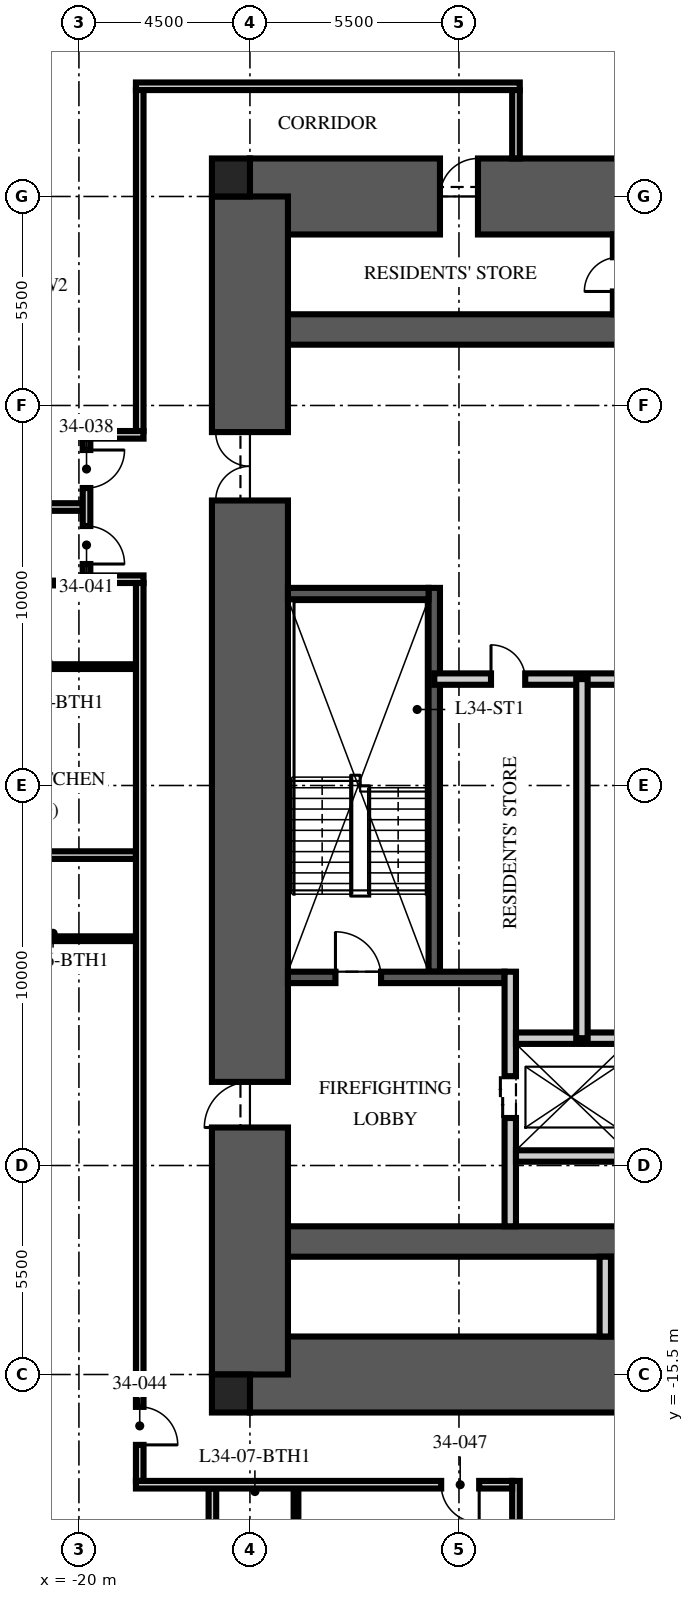
"""IFC4 building model, lengths in metres.
Left out: names, types, materials, properties, quantities, classifications, styles, units other than length and angle.
Written with IfcOpenShell. Run it as: python <this file> out.ifc"""

import sys

from ifc_helpers import new_model, si_unit, direction, frame, frame_2d, origin, origin_2d, place, context, subcontext, project, spatial, rectangle, extrude, element, fill, save


model = new_model("IFC4")
c1 = context("Model", 3, precision=1e-05, world=origin(), true_north=direction((0.0, 1.0)))
c2 = subcontext(c1, "Body", "Model", "MODEL_VIEW")
j1 = project(units=[si_unit("LENGTHUNIT", "METRE"), si_unit("PLANEANGLEUNIT", "RADIAN")], contexts=[c1])
p1 = place(None, origin())
s1 = spatial("IfcSite", under=j1, at=p1, CompositionType="ELEMENT")
p2 = place(p1, origin())
s2 = spatial("IfcBuilding", under=s1, at=p2, CompositionType="ELEMENT")
p3 = place(p2, frame((0.0, 0.0, 137.25)))
s3 = spatial("IfcBuildingStorey", under=s2, at=p3, CompositionType="ELEMENT", Elevation=137.25)
p4 = place(p3, frame((-15.5, 15.5, -0.25), z_axis=(0.0, 0.0, 1.0), x_axis=(1.0, 0.0, 0.0)))
e1 = element("IfcWall", 1, at=p4, inside=s3, PredefinedType="SHEAR", context=c2, shape_type="SweptSolid", body=[
    extrude(rectangle(XDim=31.0, YDim=2.0, at=frame_2d((15.5, 0.0))), origin(), (0.0, 0.0, 1.0), 3.75),
])
p5 = place(p4, frame((5.0, 0.0, 0.25)))
e2 = element("IfcOpeningElement", 2, at=p5, cuts=e1, PredefinedType="OPENING", context=c2, shape_type="SweptSolid", body=[
    extrude(rectangle(XDim=1.0, YDim=2.1, at=frame_2d((0.5, 1.05))), frame((0.0, 1.01, 0.0), z_axis=(0.0, -1.0, 0.0), x_axis=(1.0, 0.0, 0.0)), (0.0, 0.0, 1.0), 2.02),
])
p6 = place(p3, frame((-15.5, -15.5, -0.25), z_axis=(0.0, 0.0, 1.0), x_axis=(1.0, 0.0, 0.0)))
e3 = element("IfcWall", 3, at=p6, inside=s3, PredefinedType="SHEAR", context=c2, shape_type="SweptSolid", body=[
    extrude(rectangle(XDim=31.0, YDim=2.0, at=frame_2d((15.5, 0.0))), origin(), (0.0, 0.0, 1.0), 3.75),
])
p7 = place(p6, frame((10.4, 0.0, 0.25)))
e4 = element("IfcOpeningElement", 4, at=p7, cuts=e3, PredefinedType="OPENING", context=c2, shape_type="SweptSolid", body=[
    extrude(rectangle(XDim=1.1, YDim=2.1, at=frame_2d((0.55, 1.05))), frame((0.0, 1.01, 0.0), z_axis=(0.0, -1.0, 0.0), x_axis=(1.0, 0.0, 0.0)), (0.0, 0.0, 1.0), 2.02),
])
p8 = place(p6, frame((13.5, 0.0, 0.25)))
e5 = element("IfcOpeningElement", 5, at=p8, cuts=e3, PredefinedType="OPENING", context=c2, shape_type="SweptSolid", body=[
    extrude(rectangle(XDim=1.1, YDim=2.1, at=frame_2d((0.55, 1.05))), frame((0.0, 1.01, 0.0), z_axis=(0.0, -1.0, 0.0), x_axis=(1.0, 0.0, 0.0)), (0.0, 0.0, 1.0), 2.02),
])
p9 = place(p6, frame((16.6, 0.0, 0.25)))
e6 = element("IfcOpeningElement", 6, at=p9, cuts=e3, PredefinedType="OPENING", context=c2, shape_type="SweptSolid", body=[
    extrude(rectangle(XDim=1.1, YDim=2.1, at=frame_2d((0.55, 1.05))), frame((0.0, 1.01, 0.0), z_axis=(0.0, -1.0, 0.0), x_axis=(1.0, 0.0, 0.0)), (0.0, 0.0, 1.0), 2.02),
])
for number, where, z_axis, x_axis in (
    (7, (-15.5, 12.0, -0.25), (0.0, 0.0, 1.0), (1.0, 0.0, 0.0)),
    (8, (-15.5, -12.0, -0.25), (0.0, 0.0, 1.0), (1.0, 0.0, 0.0)),
):
    element("IfcWall", number, at=place(p3, frame(where, z_axis=z_axis, x_axis=x_axis)), inside=s3, PredefinedType="SHEAR", context=c2, shape_type="SweptSolid", body=[
        extrude(rectangle(XDim=31.0, YDim=0.8, at=frame_2d((15.5, 0.0))), origin(), (0.0, 0.0, 1.0), 3.75),
    ])
p10 = place(p3, frame((-15.5, -15.5, -0.25), z_axis=(0.0, 0.0, 1.0), x_axis=(0.0, 1.0, 0.0)))
e9 = element("IfcWall", 9, at=p10, inside=s3, PredefinedType="SHEAR", context=c2, shape_type="SweptSolid", body=[
    extrude(rectangle(XDim=31.0, YDim=2.0, at=frame_2d((15.5, 0.0))), origin(), (0.0, 0.0, 1.0), 3.75),
])
p11 = place(p10, frame((6.5, 0.0, 0.25)))
e10 = element("IfcOpeningElement", 10, at=p11, cuts=e9, PredefinedType="OPENING", context=c2, shape_type="SweptSolid", body=[
    extrude(rectangle(XDim=1.2, YDim=2.1, at=frame_2d((0.6, 1.05))), frame((0.0, 1.01, 0.0), z_axis=(0.0, -1.0, 0.0), x_axis=(1.0, 0.0, 0.0)), (0.0, 0.0, 1.0), 2.02),
])
p12 = place(p10, frame((23.0, 0.0, 0.25)))
e11 = element("IfcOpeningElement", 11, at=p12, cuts=e9, PredefinedType="OPENING", context=c2, shape_type="SweptSolid", body=[
    extrude(rectangle(XDim=1.8, YDim=2.1, at=frame_2d((0.9, 1.05))), frame((0.0, 1.01, 0.0), z_axis=(0.0, -1.0, 0.0), x_axis=(1.0, 0.0, 0.0)), (0.0, 0.0, 1.0), 2.02),
])
for number, where, z_axis, x_axis in (
    (12, (-16.0, 16.0, -0.25), (0.0, 0.0, 1.0), (1.0, 0.0, 0.0)),
    (13, (-16.0, -16.0, -0.25), (0.0, 0.0, 1.0), (1.0, 0.0, 0.0)),
):
    element("IfcColumn", number, at=place(p3, frame(where, z_axis=z_axis, x_axis=x_axis)), inside=s3, PredefinedType="COLUMN", context=c2, shape_type="SweptSolid", body=[
        extrude(rectangle(XDim=1.0, YDim=1.0, at=origin_2d()), origin(), (0.0, 0.0, 1.0), 3.75),
    ])
p13 = place(p3, frame((-10.65, -4.9, 0.0), z_axis=(0.0, 0.0, 1.0), x_axis=(0.0, 1.0, 0.0)))
e14 = element("IfcWall", 14, at=p13, inside=s3, PredefinedType="SOLIDWALL", context=c2, shape_type="SweptSolid", body=[
    extrude(rectangle(XDim=10.1, YDim=0.3, at=frame_2d((5.05, 0.0))), origin(), (0.0, 0.0, 1.0), 3.5),
])
p14 = place(p3, frame((-14.5, -5.05, 0.0), z_axis=(0.0, 0.0, 1.0), x_axis=(1.0, 0.0, 0.0)))
e15 = element("IfcWall", 15, at=p14, inside=s3, PredefinedType="SOLIDWALL", context=c2, shape_type="SweptSolid", body=[
    extrude(rectangle(XDim=5.7, YDim=0.3, at=frame_2d((2.85, 0.0))), origin(), (0.0, 0.0, 1.0), 3.5),
])
p15 = place(p14, frame((1.25, 0.0, 0.0)))
e16 = element("IfcOpeningElement", 16, at=p15, cuts=e15, PredefinedType="OPENING", context=c2, shape_type="SweptSolid", body=[
    extrude(rectangle(XDim=1.2, YDim=2.1, at=frame_2d((0.6, 1.05))), frame((0.0, 0.16, 0.0), z_axis=(0.0, -1.0, 0.0), x_axis=(1.0, 0.0, 0.0)), (0.0, 0.0, 1.0), 0.32),
])
p16 = place(p3, frame((-14.5, 5.05, 0.0), z_axis=(0.0, 0.0, 1.0), x_axis=(1.0, 0.0, 0.0)))
e17 = element("IfcWall", 17, at=p16, inside=s3, PredefinedType="SOLIDWALL", context=c2, shape_type="SweptSolid", body=[
    extrude(rectangle(XDim=3.7, YDim=0.3, at=frame_2d((1.85, 0.0))), origin(), (0.0, 0.0, 1.0), 3.5),
])
p17 = place(p3, frame((-8.65, -11.6, 0.0), z_axis=(0.0, 0.0, 1.0), x_axis=(0.0, 1.0, 0.0)))
e18 = element("IfcWall", 18, at=p17, inside=s3, PredefinedType="PARTITIONING", context=c2, shape_type="SweptSolid", body=[
    extrude(rectangle(XDim=6.7, YDim=0.3, at=frame_2d((3.35, 0.0))), origin(), (0.0, 0.0, 1.0), 3.5),
])
p18 = place(p17, frame((2.85, 0.0, 0.0)))
e19 = element("IfcOpeningElement", 19, at=p18, cuts=e18, PredefinedType="OPENING", context=c2, shape_type="SweptSolid", body=[
    extrude(rectangle(XDim=1.1, YDim=2.1, at=frame_2d((0.55, 1.05))), frame((0.0, 0.16, 0.0), z_axis=(0.0, -1.0, 0.0), x_axis=(1.0, 0.0, 0.0)), (0.0, 0.0, 1.0), 0.32),
])
p19 = place(p3, frame((-8.5, -6.65, 0.0), z_axis=(0.0, 0.0, 1.0), x_axis=(1.0, 0.0, 0.0)))
e20 = element("IfcWall", 20, at=p19, inside=s3, PredefinedType="PARTITIONING", context=c2, shape_type="SweptSolid", body=[
    extrude(rectangle(XDim=17.0, YDim=0.3, at=frame_2d((8.5, 0.0))), origin(), (0.0, 0.0, 1.0), 3.5),
])
p20 = place(p19, frame((7.8, 0.0, 0.0)))
e21 = element("IfcOpeningElement", 21, at=p20, cuts=e20, PredefinedType="OPENING", context=c2, shape_type="SweptSolid", body=[
    extrude(rectangle(XDim=1.3, YDim=2.4, at=frame_2d((0.65, 1.2))), frame((0.0, 0.16, 0.0), z_axis=(0.0, -1.0, 0.0), x_axis=(1.0, 0.0, 0.0)), (0.0, 0.0, 1.0), 0.32),
])
p21 = place(p19, frame((5.65, 0.0, 0.0)))
e22 = element("IfcOpeningElement", 22, at=p21, cuts=e20, PredefinedType="OPENING", context=c2, shape_type="SweptSolid", body=[
    extrude(rectangle(XDim=0.9, YDim=2.1, at=frame_2d((0.45, 1.05))), frame((0.0, 0.16, 0.0), z_axis=(0.0, -1.0, 0.0), x_axis=(1.0, 0.0, 0.0)), (0.0, 0.0, 1.0), 0.32),
])
p22 = place(p19, frame((10.4, 0.0, 0.0)))
e23 = element("IfcOpeningElement", 23, at=p22, cuts=e20, PredefinedType="OPENING", context=c2, shape_type="SweptSolid", body=[
    extrude(rectangle(XDim=0.9, YDim=2.1, at=frame_2d((0.45, 1.05))), frame((0.0, 0.16, 0.0), z_axis=(0.0, -1.0, 0.0), x_axis=(1.0, 0.0, 0.0)), (0.0, 0.0, 1.0), 0.32),
])
p23 = place(p3, frame((-8.5, -9.75, 0.0), z_axis=(0.0, 0.0, 1.0), x_axis=(1.0, 0.0, 0.0)))
e24 = element("IfcWall", 24, at=p23, inside=s3, PredefinedType="PARTITIONING", context=c2, shape_type="SweptSolid", body=[
    extrude(rectangle(XDim=2.9, YDim=0.3, at=frame_2d((1.45, 0.0))), origin(), (0.0, 0.0, 1.0), 3.5),
])
p24 = place(p3, frame((-6.15, -14.5, 0.0), z_axis=(0.0, 0.0, 1.0), x_axis=(0.0, 1.0, 0.0)))
e25 = element("IfcWall", 25, at=p24, inside=s3, PredefinedType="PARTITIONING", context=c2, shape_type="SweptSolid", body=[
    extrude(rectangle(XDim=2.1, YDim=0.3, at=frame_2d((1.05, 0.0))), origin(), (0.0, 0.0, 1.0), 3.5),
])
p25 = place(p3, frame((-10.65, 2.8, 0.0), z_axis=(0.0, 0.0, 1.0), x_axis=(1.0, 0.0, 0.0)))
e26 = element("IfcWall", 26, at=p25, inside=s3, PredefinedType="PARTITIONING", context=c2, shape_type="SweptSolid", body=[
    extrude(rectangle(XDim=21.3, YDim=0.3, at=frame_2d((10.65, 0.0))), origin(), (0.0, 0.0, 1.0), 3.5),
])
p26 = place(p25, frame((10.05, 0.0, 0.0)))
e27 = element("IfcOpeningElement", 27, at=p26, cuts=e26, PredefinedType="OPENING", context=c2, shape_type="SweptSolid", body=[
    extrude(rectangle(XDim=1.2, YDim=2.1, at=frame_2d((0.6, 1.05))), frame((0.0, 0.16, 0.0), z_axis=(0.0, -1.0, 0.0), x_axis=(1.0, 0.0, 0.0)), (0.0, 0.0, 1.0), 0.32),
])
p27 = place(p25, frame((1.493, 0.0, 0.0)))
e28 = element("IfcOpeningElement", 28, at=p27, cuts=e26, PredefinedType="OPENING", context=c2, shape_type="SweptSolid", body=[
    extrude(rectangle(XDim=0.9, YDim=2.1, at=frame_2d((0.45, 1.05))), frame((0.0, 0.16, 0.0), z_axis=(0.0, -1.0, 0.0), x_axis=(1.0, 0.0, 0.0)), (0.0, 0.0, 1.0), 0.32),
])
p28 = place(p25, frame((18.836, 0.0, 0.0)))
e29 = element("IfcOpeningElement", 29, at=p28, cuts=e26, PredefinedType="OPENING", context=c2, shape_type="SweptSolid", body=[
    extrude(rectangle(XDim=0.9, YDim=2.1, at=frame_2d((0.45, 1.05))), frame((0.0, 0.16, 0.0), z_axis=(0.0, -1.0, 0.0), x_axis=(1.0, 0.0, 0.0)), (0.0, 0.0, 1.0), 0.32),
])
p29 = place(p3, frame((-6.764, -6.65, 0.0), z_axis=(0.0, 0.0, 1.0), x_axis=(0.0, 1.0, 0.0)))
e30 = element("IfcWall", 30, at=p29, inside=s3, PredefinedType="PARTITIONING", context=c2, shape_type="SweptSolid", body=[
    extrude(rectangle(XDim=9.45, YDim=0.3, at=frame_2d((4.725, 0.0))), origin(), (0.0, 0.0, 1.0), 3.5),
])
p30 = place(p3, frame((-5.8, 12.4, 0.0), z_axis=(0.0, 0.0, 1.0), x_axis=(0.0, 1.0, 0.0)))
e31 = element("IfcWall", 31, at=p30, inside=s3, PredefinedType="PARTITIONING", context=c2, shape_type="SweptSolid", body=[
    extrude(rectangle(XDim=2.1, YDim=0.3, at=frame_2d((1.05, 0.0))), origin(), (0.0, 0.0, 1.0), 3.5),
])
p31 = place(p30, frame((0.6, 0.0, 0.0)))
e32 = element("IfcOpeningElement", 32, at=p31, cuts=e31, PredefinedType="OPENING", context=c2, shape_type="SweptSolid", body=[
    extrude(rectangle(XDim=0.9, YDim=2.1, at=frame_2d((0.45, 1.05))), frame((0.0, 0.16, 0.0), z_axis=(0.0, -1.0, 0.0), x_axis=(1.0, 0.0, 0.0)), (0.0, 0.0, 1.0), 0.32),
])
p32 = place(p3, frame((-18.5, 18.4, 0.0), z_axis=(0.0, 0.0, 1.0), x_axis=(1.0, 0.0, 0.0)))
e33 = element("IfcWall", 33, at=p32, inside=s3, PredefinedType="PARTITIONING", context=c2, shape_type="SweptSolid", body=[
    extrude(rectangle(XDim=10.1, YDim=0.2, at=frame_2d((5.05, 0.0))), origin(), (0.0, 0.0, 1.0), 2.3),
])
p33 = place(p3, frame((-8.5, 18.3, 0.0), z_axis=(0.0, 0.0, 1.0), x_axis=(0.0, -1.0, 0.0)))
e34 = element("IfcWall", 34, at=p33, inside=s3, PredefinedType="PARTITIONING", context=c2, shape_type="SweptSolid", body=[
    extrude(rectangle(XDim=1.8, YDim=0.2, at=frame_2d((0.9, 0.0))), origin(), (0.0, 0.0, 1.0), 3.5),
])
p34 = place(p3, frame((-19.9, 7.328, 0.0), z_axis=(0.0, 0.0, 1.0), x_axis=(-1.0, 0.0, 0.0)))
e35 = element("IfcWall", 35, at=p34, inside=s3, PredefinedType="PARTITIONING", context=c2, shape_type="SweptSolid", body=[
    extrude(rectangle(XDim=8.75, YDim=0.2, at=frame_2d((4.375, 0.0))), origin(), (0.0, 0.0, 1.0), 2.81),
])
for number, where, z_axis, x_axis in (
    (36, (-18.5, -1.832, 0.0), (0.0, 0.0, 1.0), (-1.0, 0.0, 0.0)),
    (37, (-16.488, -18.5, 0.0), (0.0, 0.0, 1.0), (0.0, -1.0, 0.0)),
):
    element("IfcWall", number, at=place(p3, frame(where, z_axis=z_axis, x_axis=x_axis)), inside=s3, PredefinedType="PARTITIONING", context=c2, shape_type="SweptSolid", body=[
        extrude(rectangle(XDim=10.15, YDim=0.2, at=frame_2d((5.075, 0.0))), origin(), (0.0, 0.0, 1.0), 2.81),
    ])
p35 = place(p3, frame((-19.97, 5.328, 0.0), z_axis=(0.0, 0.0, 1.0), x_axis=(-1.0, 0.0, 0.0)))
e38 = element("IfcWall", 38, at=p35, inside=s3, PredefinedType="PARTITIONING", context=c2, shape_type="SweptSolid", body=[
    extrude(rectangle(XDim=2.56, YDim=0.125, at=frame_2d((1.28, 0.0))), origin(), (0.0, 0.0, 1.0), 3.5),
])
for number, where, z_axis, x_axis in (
    (39, (-18.5, 3.128, 0.0), (0.0, 0.0, 1.0), (-1.0, 0.0, 0.0)),
    (40, (-18.5, -4.032, 0.0), (0.0, 0.0, 1.0), (-1.0, 0.0, 0.0)),
    (41, (-14.288, -18.5, 0.0), (0.0, 0.0, 1.0), (0.0, -1.0, 0.0)),
):
    element("IfcWall", number, at=place(p3, frame(where, z_axis=z_axis, x_axis=x_axis)), inside=s3, PredefinedType="PARTITIONING", context=c2, shape_type="SweptSolid", body=[
        extrude(rectangle(XDim=4.03, YDim=0.125, at=frame_2d((2.015, 0.0))), origin(), (0.0, 0.0, 1.0), 3.5),
    ])
p36 = place(p3, frame((-18.4, 18.3, 0.0), z_axis=(0.0, 0.0, 1.0), x_axis=(0.0, -1.0, 0.0)))
e42 = element("IfcWall", 42, at=p36, inside=s3, PredefinedType="PARTITIONING", context=c2, shape_type="SweptSolid", body=[
    extrude(rectangle(XDim=8.972, YDim=0.2, at=frame_2d((4.486, 0.0))), origin(), (0.0, 0.0, 1.0), 2.3),
])
p37 = place(p3, frame((-18.3, 9.228, 0.0), z_axis=(0.0, 0.0, 1.0), x_axis=(-1.0, 0.0, 0.0)))
e43 = element("IfcWall", 43, at=p37, inside=s3, PredefinedType="PARTITIONING", context=c2, shape_type="SweptSolid", body=[
    extrude(rectangle(XDim=1.6, YDim=0.2, at=frame_2d((0.8, 0.0))), origin(), (0.0, 0.0, 1.0), 2.7),
])
p38 = place(p3, frame((-18.3, 5.428, 0.0), z_axis=(0.0, 0.0, 1.0), x_axis=(-1.0, 0.0, 0.0)))
e44 = element("IfcWall", 44, at=p38, inside=s3, PredefinedType="PARTITIONING", context=c2, shape_type="SweptSolid", body=[
    extrude(rectangle(XDim=1.6, YDim=0.2, at=frame_2d((0.8, 0.0))), origin(), (0.0, 0.0, 1.0), 3.5),
])
p39 = place(p3, frame((-19.8, 9.128, 0.0), z_axis=(0.0, 0.0, 1.0), x_axis=(0.0, -1.0, 0.0)))
e45 = element("IfcWall", 45, at=p39, inside=s3, PredefinedType="PARTITIONING", context=c2, shape_type="SweptSolid", body=[
    extrude(rectangle(XDim=3.6, YDim=0.2, at=frame_2d((1.8, 0.0))), origin(), (0.0, 0.0, 1.0), 2.7),
])
p40 = place(p39, frame((0.3, 0.0, 0.0)))
e46 = element("IfcOpeningElement", 46, at=p40, cuts=e45, PredefinedType="OPENING", context=c2, shape_type="SweptSolid", body=[
    extrude(rectangle(XDim=1.0, YDim=2.2, at=frame_2d((0.5, 1.1))), frame((0.0, 0.11, 0.0), z_axis=(0.0, -1.0, 0.0), x_axis=(1.0, 0.0, 0.0)), (0.0, 0.0, 1.0), 0.22),
])
p41 = place(p39, frame((2.3, 0.0, 0.0)))
e47 = element("IfcOpeningElement", 47, at=p41, cuts=e45, PredefinedType="OPENING", context=c2, shape_type="SweptSolid", body=[
    extrude(rectangle(XDim=1.0, YDim=2.2, at=frame_2d((0.5, 1.1))), frame((0.0, 0.11, 0.0), z_axis=(0.0, -1.0, 0.0), x_axis=(1.0, 0.0, 0.0)), (0.0, 0.0, 1.0), 0.22),
])
p42 = place(p3, frame((-18.4, 5.328, 0.0), z_axis=(0.0, 0.0, 1.0), x_axis=(0.0, -1.0, 0.0)))
e48 = element("IfcWall", 48, at=p42, inside=s3, PredefinedType="PARTITIONING", context=c2, shape_type="SweptSolid", body=[
    extrude(rectangle(XDim=23.628, YDim=0.2, at=frame_2d((11.814, 0.0))), origin(), (0.0, 0.0, 1.0), 2.3),
])
p43 = place(p42, frame((21.68, 0.0, 0.0)))
e49 = element("IfcOpeningElement", 49, at=p43, cuts=e48, PredefinedType="OPENING", context=c2, shape_type="SweptSolid", body=[
    extrude(rectangle(XDim=1.0, YDim=2.2, at=frame_2d((0.5, 1.1))), frame((0.0, 0.11, 0.0), z_axis=(0.0, -1.0, 0.0), x_axis=(1.0, 0.0, 0.0)), (0.0, 0.0, 1.0), 0.22),
])
p44 = place(p3, frame((-8.5, -18.3, 0.0), z_axis=(0.0, 0.0, 1.0), x_axis=(0.0, -1.0, 0.0)))
e50 = element("IfcWall", 50, at=p44, inside=s3, PredefinedType="PARTITIONING", context=c2, shape_type="SweptSolid", body=[
    extrude(rectangle(XDim=3.0, YDim=0.2, at=frame_2d((1.5, 0.0))), origin(), (0.0, 0.0, 1.0), 3.5),
])
p45 = place(p3, frame((-8.6, -18.4, 0.0), z_axis=(0.0, 0.0, 1.0), x_axis=(-1.0, 0.0, 0.0)))
e51 = element("IfcWall", 51, at=p45, inside=s3, PredefinedType="PARTITIONING", context=c2, shape_type="SweptSolid", body=[
    extrude(rectangle(XDim=9.9, YDim=0.2, at=frame_2d((4.95, 0.0))), origin(), (0.0, 0.0, 1.0), 2.3),
])
p46 = place(p45, frame((0.868, 0.0, 0.0)))
e52 = element("IfcOpeningElement", 52, at=p46, cuts=e51, PredefinedType="OPENING", context=c2, shape_type="SweptSolid", body=[
    extrude(rectangle(XDim=1.0, YDim=2.2, at=frame_2d((0.5, 1.1))), frame((0.0, 0.11, 0.0), z_axis=(0.0, -1.0, 0.0), x_axis=(1.0, 0.0, 0.0)), (0.0, 0.0, 1.0), 0.22),
])
p47 = place(p15, origin())
e53 = element("IfcDoor", 53, at=p47, inside=s3, OperationType="SINGLE_SWING_LEFT", PredefinedType="DOOR", context=c2, shape_type="SweptSolid", body=[
    extrude(rectangle(XDim=1.2, YDim=2.1, at=frame_2d((0.6, 1.05))), frame((0.0, 0.025, 0.0), z_axis=(0.0, -1.0, 0.0), x_axis=(1.0, 0.0, 0.0)), (0.0, 0.0, 1.0), 0.05),
])
fill(e16, e53)
p48 = place(p11, origin())
e54 = element("IfcDoor", 54, at=p48, inside=s3, OperationType="SINGLE_SWING_LEFT", PredefinedType="DOOR", context=c2, shape_type="SweptSolid", body=[
    extrude(rectangle(XDim=1.2, YDim=2.1, at=frame_2d((0.6, 1.05))), frame((0.0, 0.025, 0.0), z_axis=(0.0, -1.0, 0.0), x_axis=(1.0, 0.0, 0.0)), (0.0, 0.0, 1.0), 0.05),
])
fill(e10, e54)
p49 = place(p12, origin())
e55 = element("IfcDoor", 55, at=p49, inside=s3, OperationType="DOUBLE_DOOR_SINGLE_SWING", PredefinedType="DOOR", context=c2, shape_type="SweptSolid", body=[
    extrude(rectangle(XDim=1.8, YDim=2.1, at=frame_2d((0.9, 1.05))), frame((0.0, 0.025, 0.0), z_axis=(0.0, -1.0, 0.0), x_axis=(1.0, 0.0, 0.0)), (0.0, 0.0, 1.0), 0.05),
])
fill(e11, e55)
p50 = place(p18, origin())
e56 = element("IfcDoor", 56, at=p50, inside=s3, OperationType="DOUBLE_DOOR_SLIDING", PredefinedType="DOOR", context=c2, shape_type="SweptSolid", body=[
    extrude(rectangle(XDim=1.1, YDim=2.1, at=frame_2d((0.55, 1.05))), frame((0.0, 0.025, 0.0), z_axis=(0.0, -1.0, 0.0), x_axis=(1.0, 0.0, 0.0)), (0.0, 0.0, 1.0), 0.05),
])
fill(e19, e56)
p51 = place(p27, origin())
e57 = element("IfcDoor", 57, at=p51, inside=s3, OperationType="SINGLE_SWING_LEFT", PredefinedType="DOOR", context=c2, shape_type="SweptSolid", body=[
    extrude(rectangle(XDim=0.9, YDim=2.1, at=frame_2d((0.45, 1.05))), frame((0.0, 0.025, 0.0), z_axis=(0.0, -1.0, 0.0), x_axis=(1.0, 0.0, 0.0)), (0.0, 0.0, 1.0), 0.05),
])
fill(e28, e57)
p52 = place(p5, origin())
e58 = element("IfcDoor", 58, at=p52, inside=s3, OperationType="SINGLE_SWING_RIGHT", PredefinedType="DOOR", context=c2, shape_type="SweptSolid", body=[
    extrude(rectangle(XDim=1.0, YDim=2.1, at=frame_2d((0.5, 1.05))), frame((0.0, 0.025, 0.0), z_axis=(0.0, -1.0, 0.0), x_axis=(1.0, 0.0, 0.0)), (0.0, 0.0, 1.0), 0.05),
])
fill(e2, e58)
p53 = place(p40, origin())
e59 = element("IfcDoor", 59, at=p53, inside=s3, OperationType="SINGLE_SWING_LEFT", PredefinedType="DOOR", context=c2, shape_type="SweptSolid", body=[
    extrude(rectangle(XDim=1.0, YDim=2.2, at=frame_2d((0.5, 1.1))), frame((0.0, 0.025, 0.0), z_axis=(0.0, -1.0, 0.0), x_axis=(1.0, 0.0, 0.0)), (0.0, 0.0, 1.0), 0.05),
])
fill(e46, e59)
p54 = place(p41, origin())
e60 = element("IfcDoor", 60, at=p54, inside=s3, OperationType="SINGLE_SWING_RIGHT", PredefinedType="DOOR", context=c2, shape_type="SweptSolid", body=[
    extrude(rectangle(XDim=1.0, YDim=2.2, at=frame_2d((0.5, 1.1))), frame((0.0, 0.025, 0.0), z_axis=(0.0, -1.0, 0.0), x_axis=(1.0, 0.0, 0.0)), (0.0, 0.0, 1.0), 0.05),
])
fill(e47, e60)
p55 = place(p43, origin())
e61 = element("IfcDoor", 61, at=p55, inside=s3, OperationType="SINGLE_SWING_RIGHT", PredefinedType="DOOR", context=c2, shape_type="SweptSolid", body=[
    extrude(rectangle(XDim=1.0, YDim=2.2, at=frame_2d((0.5, 1.1))), frame((0.0, 0.025, 0.0), z_axis=(0.0, -1.0, 0.0), x_axis=(1.0, 0.0, 0.0)), (0.0, 0.0, 1.0), 0.05),
])
fill(e49, e61)
p56 = place(p46, origin())
e62 = element("IfcDoor", 62, at=p56, inside=s3, OperationType="SINGLE_SWING_LEFT", PredefinedType="DOOR", context=c2, shape_type="SweptSolid", body=[
    extrude(rectangle(XDim=1.0, YDim=2.2, at=frame_2d((0.5, 1.1))), frame((0.0, 0.025, 0.0), z_axis=(0.0, -1.0, 0.0), x_axis=(1.0, 0.0, 0.0)), (0.0, 0.0, 1.0), 0.05),
])
fill(e52, e62)
save(model, sys.argv[1])
